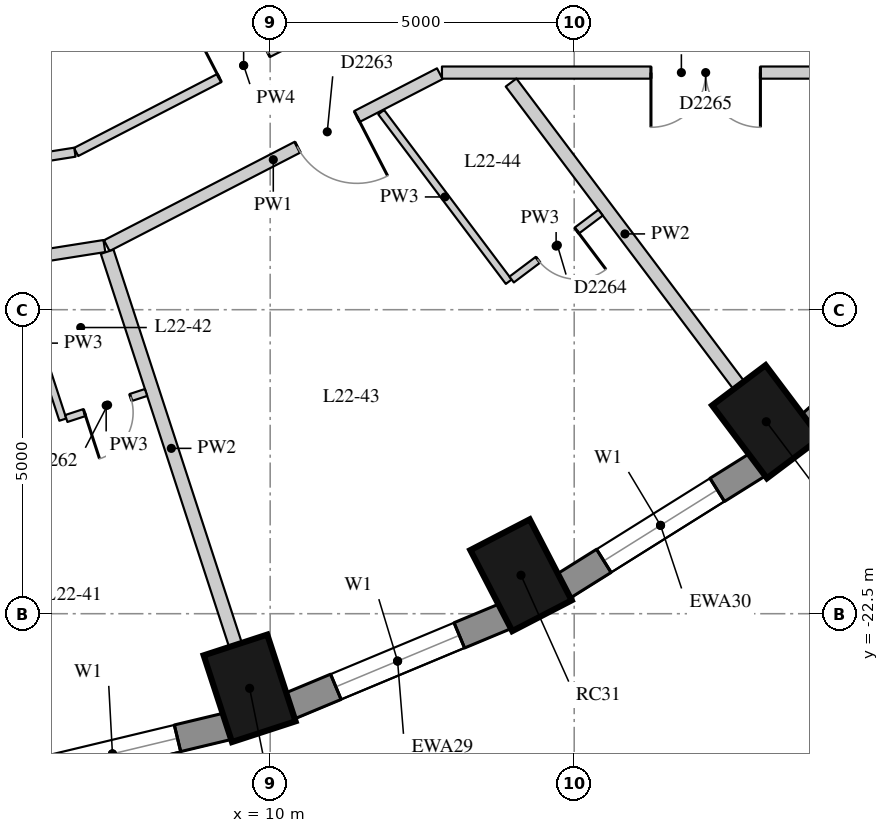
"""IFC4 building model, lengths in metres.
Left out: names, types, materials, properties, quantities, classifications, styles, units other than length and angle.
Written with IfcOpenShell. Run it as: python <this file> out.ifc"""

import sys

from ifc_helpers import new_model, si_unit, direction, frame, frame_2d, origin, origin_2d, place, context, subcontext, project, spatial, rectangle, extrude, element, fill, save


model = new_model("IFC4")
c1 = context("Model", 3, precision=1e-05, world=origin(), true_north=direction((0.0, 1.0)))
c2 = subcontext(c1, "Body", "Model", "MODEL_VIEW")
j1 = project(units=[si_unit("LENGTHUNIT", "METRE"), si_unit("PLANEANGLEUNIT", "RADIAN")], contexts=[c1])
p1 = place(None, origin())
s1 = spatial("IfcSite", under=j1, at=p1, CompositionType="ELEMENT")
p2 = place(p1, origin())
s2 = spatial("IfcBuilding", under=s1, at=p2, CompositionType="ELEMENT")
p3 = place(p2, frame((0.0, 0.0, 81.1)))
s3 = spatial("IfcBuildingStorey", under=s2, at=p3, CompositionType="ELEMENT", Elevation=81.1)
for number, where, z_axis, x_axis in (
    (1, (9.662, -23.727, 0.0), (0.0, 0.0, 1.0), (0.31, -0.951, 0.0)),
    (2, (14.125, -21.867, 0.0), (0.0, 0.0, 1.0), (0.46, -0.888, 0.0)),
    (3, (18.159, -19.343, 0.0), (0.0, 0.0, 1.0), (0.601, -0.799, 0.0)),
):
    element("IfcColumn", number, at=place(p3, frame(where, z_axis=z_axis, x_axis=x_axis)), inside=s3, PredefinedType="COLUMN", context=c2, shape_type="SweptSolid", body=[
        extrude(rectangle(XDim=1.5, YDim=1.1, at=origin_2d()), origin(), (0.0, 0.0, 1.0), 3.3),
    ])
p4 = place(p3, frame((5.504, -25.26, 0.0), z_axis=(0.0, 0.0, 1.0), x_axis=(0.972496561493, 0.232917233979, 0.0)))
e4 = element("IfcWall", 4, at=p4, inside=s3, PredefinedType="SOLIDWALL", context=c2, shape_type="SweptSolid", body=[
    extrude(rectangle(XDim=3.911, YDim=0.45, at=frame_2d((1.956, 0.0))), origin(), (0.0, 0.0, 1.0), 2.85),
])
p5 = place(p4, frame((0.855, 0.0, 0.4)))
e5 = element("IfcOpeningElement", 5, at=p5, cuts=e4, PredefinedType="OPENING", context=c2, shape_type="SweptSolid", body=[
    extrude(rectangle(XDim=2.2, YDim=1.75, at=frame_2d((1.1, 0.875))), frame((0.0, 0.235, 0.0), z_axis=(0.0, -1.0, 0.0), x_axis=(1.0, 0.0, 0.0)), (0.0, 0.0, 1.0), 0.47),
])
p6 = place(p3, frame((10.315, -24.021, 0.0), z_axis=(0.0, 0.0, 1.0), x_axis=(0.923031964282, 0.384723267966, 0.0)))
e6 = element("IfcWall", 6, at=p6, inside=s3, PredefinedType="SOLIDWALL", context=c2, shape_type="SweptSolid", body=[
    extrude(rectangle(XDim=3.856, YDim=0.45, at=frame_2d((1.928, 0.0))), origin(), (0.0, 0.0, 1.0), 2.85),
])
p7 = place(p6, frame((0.828, 0.0, 0.4)))
e7 = element("IfcOpeningElement", 7, at=p7, cuts=e6, PredefinedType="OPENING", context=c2, shape_type="SweptSolid", body=[
    extrude(rectangle(XDim=2.2, YDim=1.75, at=frame_2d((1.1, 0.875))), frame((0.0, 0.235, 0.0), z_axis=(0.0, -1.0, 0.0), x_axis=(1.0, 0.0, 0.0)), (0.0, 0.0, 1.0), 0.47),
])
p8 = place(p3, frame((14.817, -22.051, 0.0), z_axis=(0.0, 0.0, 1.0), x_axis=(0.847635480093, 0.530579016629, 0.0)))
e8 = element("IfcWall", 8, at=p8, inside=s3, PredefinedType="SOLIDWALL", context=c2, shape_type="SweptSolid", body=[
    extrude(rectangle(XDim=3.782, YDim=0.45, at=frame_2d((1.891, 0.0))), origin(), (0.0, 0.0, 1.0), 2.85),
])
p9 = place(p8, frame((0.791, 0.0, 0.4)))
e9 = element("IfcOpeningElement", 9, at=p9, cuts=e8, PredefinedType="OPENING", context=c2, shape_type="SweptSolid", body=[
    extrude(rectangle(XDim=2.2, YDim=1.75, at=frame_2d((1.1, 0.875))), frame((0.0, 0.235, 0.0), z_axis=(0.0, -1.0, 0.0), x_axis=(1.0, 0.0, 0.0)), (0.0, 0.0, 1.0), 0.47),
])
p10 = place(p3, frame((18.871, -19.407, 0.0), z_axis=(0.0, 0.0, 1.0), x_axis=(0.745526233716, 0.66647628228, 0.0)))
e10 = element("IfcWall", 10, at=p10, inside=s3, PredefinedType="SOLIDWALL", context=c2, shape_type="SweptSolid", body=[
    extrude(rectangle(XDim=3.697, YDim=0.45, at=frame_2d((1.848, 0.0))), origin(), (0.0, 0.0, 1.0), 2.85),
])
p11 = place(p3, frame((20.7, -13.6, 0.0), z_axis=(0.0, 0.0, 1.0), x_axis=(-1.0, 0.0, 0.0)))
e11 = element("IfcWall", 11, at=p11, inside=s3, PredefinedType="PARTITIONING", context=c2, shape_type="SweptSolid", body=[
    extrude(rectangle(XDim=7.875, YDim=0.2, at=frame_2d((3.938, 0.0))), origin(), (0.0, 0.0, 1.0), 2.85),
])
p12 = place(p11, frame((2.638, 0.0, 0.0)))
e12 = element("IfcOpeningElement", 12, at=p12, cuts=e11, PredefinedType="OPENING", context=c2, shape_type="SweptSolid", body=[
    extrude(rectangle(XDim=1.8, YDim=2.1, at=frame_2d((0.9, 1.05))), frame((0.0, 0.11, 0.0), z_axis=(0.0, -1.0, 0.0), x_axis=(1.0, 0.0, 0.0)), (0.0, 0.0, 1.0), 0.22),
])
p13 = place(p3, frame((12.79, -13.619, 0.0), z_axis=(0.0, 0.0, 1.0), x_axis=(-0.888545137607, -0.458789209152, 0.0)))
e13 = element("IfcWall", 13, at=p13, inside=s3, PredefinedType="PARTITIONING", context=c2, shape_type="SweptSolid", body=[
    extrude(rectangle(XDim=6.164, YDim=0.2, at=frame_2d((3.082, 0.0))), origin(), (0.0, 0.0, 1.0), 2.85),
])
p14 = place(p13, frame((1.533, 0.0, 0.0)))
e14 = element("IfcOpeningElement", 14, at=p14, cuts=e13, PredefinedType="OPENING", context=c2, shape_type="SweptSolid", body=[
    extrude(rectangle(XDim=1.1, YDim=2.1, at=frame_2d((0.55, 1.05))), frame((0.0, 0.11, 0.0), z_axis=(0.0, -1.0, 0.0), x_axis=(1.0, 0.0, 0.0)), (0.0, 0.0, 1.0), 0.22),
])
p15 = place(p3, frame((7.273, -16.453, 0.0), z_axis=(0.0, 0.0, 1.0), x_axis=(-0.987787686426, -0.155805925901, 0.0)))
e15 = element("IfcWall", 15, at=p15, inside=s3, PredefinedType="PARTITIONING", context=c2, shape_type="SweptSolid", body=[
    extrude(rectangle(XDim=7.363, YDim=0.2, at=frame_2d((3.682, 0.0))), origin(), (0.0, 0.0, 1.0), 2.85),
])
p16 = place(p15, frame((5.161, 0.0, 0.0)))
e16 = element("IfcOpeningElement", 16, at=p16, cuts=e15, PredefinedType="OPENING", context=c2, shape_type="SweptSolid", body=[
    extrude(rectangle(XDim=0.9, YDim=2.1, at=frame_2d((0.45, 1.05))), frame((0.0, 0.11, 0.0), z_axis=(0.0, -1.0, 0.0), x_axis=(1.0, 0.0, 0.0)), (0.0, 0.0, 1.0), 0.22),
])
p17 = place(p15, frame((1.957, 0.0, 0.0)))
e17 = element("IfcOpeningElement", 17, at=p17, cuts=e15, PredefinedType="OPENING", context=c2, shape_type="SweptSolid", body=[
    extrude(rectangle(XDim=1.0, YDim=2.1, at=frame_2d((0.5, 1.05))), frame((0.0, 0.11, 0.0), z_axis=(0.0, -1.0, 0.0), x_axis=(1.0, 0.0, 0.0)), (0.0, 0.0, 1.0), 0.22),
])
p18 = place(p3, frame((12.319, -12.061, 0.0), z_axis=(0.0, 0.0, 1.0), x_axis=(-0.888525413766, -0.458827406648, 0.0)))
e18 = element("IfcWall", 18, at=p18, inside=s3, PredefinedType="PARTITIONING", context=c2, shape_type="SweptSolid", body=[
    extrude(rectangle(XDim=6.202, YDim=0.15, at=frame_2d((3.101, 0.0))), origin(), (0.0, 0.0, 1.0), 2.85),
])
p19 = place(p18, frame((2.651, 0.0, 0.0)))
e19 = element("IfcOpeningElement", 19, at=p19, cuts=e18, PredefinedType="OPENING", context=c2, shape_type="SweptSolid", body=[
    extrude(rectangle(XDim=0.9, YDim=2.1, at=frame_2d((0.45, 1.05))), frame((0.0, 0.085, 0.0), z_axis=(0.0, -1.0, 0.0), x_axis=(1.0, 0.0, 0.0)), (0.0, 0.0, 1.0), 0.17),
])
p20 = place(p3, frame((6.788, -14.909, 0.0), z_axis=(0.0, 0.0, 1.0), x_axis=(-0.987791284458, -0.15578311317, 0.0)))
e20 = element("IfcWall", 20, at=p20, inside=s3, PredefinedType="PARTITIONING", context=c2, shape_type="SweptSolid", body=[
    extrude(rectangle(XDim=3.633, YDim=0.15, at=frame_2d((1.816, 0.0))), origin(), (0.0, 0.0, 1.0), 2.85),
])
p21 = place(p3, frame((9.429, -23.014, 0.0), z_axis=(0.0, 0.0, 1.0), x_axis=(-0.310213813997, 0.95066681314, 0.0)))
e21 = element("IfcWall", 21, at=p21, inside=s3, PredefinedType="PARTITIONING", context=c2, shape_type="SweptSolid", body=[
    extrude(rectangle(XDim=6.803, YDim=0.22, at=frame_2d((3.401, 0.0))), origin(), (0.0, 0.0, 1.0), 2.85),
])
p22 = place(p3, frame((17.708, -18.743, 0.0), z_axis=(0.0, 0.0, 1.0), x_axis=(-0.601177883261, 0.799115231164, 0.0)))
e22 = element("IfcWall", 22, at=p22, inside=s3, PredefinedType="PARTITIONING", context=c2, shape_type="SweptSolid", body=[
    extrude(rectangle(XDim=6.231, YDim=0.22, at=frame_2d((3.116, 0.0))), origin(), (0.0, 0.0, 1.0), 2.85),
])
p23 = place(p3, frame((5.768, -16.792, 0.0), z_axis=(0.0, 0.0, 1.0), x_axis=(0.310272506556, -0.950647659059, 0.0)))
e23 = element("IfcWall", 23, at=p23, inside=s3, PredefinedType="PARTITIONING", context=c2, shape_type="SweptSolid", body=[
    extrude(rectangle(XDim=2.647, YDim=0.12, at=frame_2d((1.323, 0.0))), origin(), (0.0, 0.0, 1.0), 2.85),
])
p24 = place(p3, frame((11.825, -14.251, 0.0), z_axis=(0.0, 0.0, 1.0), x_axis=(0.601196964615, -0.799100875821, 0.0)))
e24 = element("IfcWall", 24, at=p24, inside=s3, PredefinedType="PARTITIONING", context=c2, shape_type="SweptSolid", body=[
    extrude(rectangle(XDim=3.49, YDim=0.12, at=frame_2d((1.745, 0.0))), origin(), (0.0, 0.0, 1.0), 2.85),
])
p25 = place(p3, frame((6.647, -19.29, 0.0), z_axis=(0.0, 0.0, 1.0), x_axis=(0.950628893115, 0.310329997864, 0.0)))
e25 = element("IfcWall", 25, at=p25, inside=s3, PredefinedType="PARTITIONING", context=c2, shape_type="SweptSolid", body=[
    extrude(rectangle(XDim=1.38, YDim=0.12, at=frame_2d((0.69, 0.0))), origin(), (0.0, 0.0, 1.0), 2.85),
])
p26 = place(p25, frame((0.315, 0.0, 0.0)))
e26 = element("IfcOpeningElement", 26, at=p26, cuts=e25, PredefinedType="OPENING", context=c2, shape_type="SweptSolid", body=[
    extrude(rectangle(XDim=0.8, YDim=2.1, at=frame_2d((0.4, 1.05))), frame((0.0, 0.07, 0.0), z_axis=(0.0, -1.0, 0.0), x_axis=(1.0, 0.0, 0.0)), (0.0, 0.0, 1.0), 0.14),
])
p27 = place(p3, frame((13.971, -17.004, 0.0), z_axis=(0.0, 0.0, 1.0), x_axis=(0.799231057954, 0.60102388971, 0.0)))
e27 = element("IfcWall", 27, at=p27, inside=s3, PredefinedType="PARTITIONING", context=c2, shape_type="SweptSolid", body=[
    extrude(rectangle(XDim=1.83, YDim=0.12, at=frame_2d((0.915, 0.0))), origin(), (0.0, 0.0, 1.0), 2.85),
])
p28 = place(p27, frame((0.54, 0.0, 0.0)))
e28 = element("IfcOpeningElement", 28, at=p28, cuts=e27, PredefinedType="OPENING", context=c2, shape_type="SweptSolid", body=[
    extrude(rectangle(XDim=0.8, YDim=2.1, at=frame_2d((0.4, 1.05))), frame((0.0, 0.07, 0.0), z_axis=(0.0, -1.0, 0.0), x_axis=(1.0, 0.0, 0.0)), (0.0, 0.0, 1.0), 0.14),
])
p29 = place(p5, origin())
e29 = element("IfcWindow", 29, at=p29, inside=s3, PartitioningType="SINGLE_PANEL", PredefinedType="WINDOW", context=c2, shape_type="SweptSolid", body=[
    extrude(rectangle(XDim=2.2, YDim=1.75, at=frame_2d((1.1, 0.875))), frame((0.0, 0.035, 0.0), z_axis=(0.0, -1.0, 0.0), x_axis=(1.0, 0.0, 0.0)), (0.0, 0.0, 1.0), 0.06),
])
fill(e5, e29)
p30 = place(p7, origin())
e30 = element("IfcWindow", 30, at=p30, inside=s3, PartitioningType="SINGLE_PANEL", PredefinedType="WINDOW", context=c2, shape_type="SweptSolid", body=[
    extrude(rectangle(XDim=2.2, YDim=1.75, at=frame_2d((1.1, 0.875))), frame((0.0, 0.035, 0.0), z_axis=(0.0, -1.0, 0.0), x_axis=(1.0, 0.0, 0.0)), (0.0, 0.0, 1.0), 0.06),
])
fill(e7, e30)
p31 = place(p9, origin())
e31 = element("IfcWindow", 31, at=p31, inside=s3, PartitioningType="SINGLE_PANEL", PredefinedType="WINDOW", context=c2, shape_type="SweptSolid", body=[
    extrude(rectangle(XDim=2.2, YDim=1.75, at=frame_2d((1.1, 0.875))), frame((0.0, 0.035, 0.0), z_axis=(0.0, -1.0, 0.0), x_axis=(1.0, 0.0, 0.0)), (0.0, 0.0, 1.0), 0.06),
])
fill(e9, e31)
p32 = place(p26, origin())
e32 = element("IfcDoor", 32, at=p32, inside=s3, OperationType="SINGLE_SWING_RIGHT", PredefinedType="DOOR", context=c2, shape_type="SweptSolid", body=[
    extrude(rectangle(XDim=0.8, YDim=2.1, at=frame_2d((0.4, 1.05))), frame((0.0, 0.025, 0.0), z_axis=(0.0, -1.0, 0.0), x_axis=(1.0, 0.0, 0.0)), (0.0, 0.0, 1.0), 0.05),
])
fill(e26, e32)
p33 = place(p14, origin())
e33 = element("IfcDoor", 33, at=p33, inside=s3, OperationType="SINGLE_SWING_LEFT", PredefinedType="DOOR", context=c2, shape_type="SweptSolid", body=[
    extrude(rectangle(XDim=1.1, YDim=2.1, at=frame_2d((0.55, 1.05))), frame((0.0, 0.025, 0.0), z_axis=(0.0, -1.0, 0.0), x_axis=(1.0, 0.0, 0.0)), (0.0, 0.0, 1.0), 0.05),
])
fill(e14, e33)
p34 = place(p28, origin())
e34 = element("IfcDoor", 34, at=p34, inside=s3, OperationType="SINGLE_SWING_LEFT", PredefinedType="DOOR", context=c2, shape_type="SweptSolid", body=[
    extrude(rectangle(XDim=0.8, YDim=2.1, at=frame_2d((0.4, 1.05))), frame((0.0, 0.025, 0.0), z_axis=(0.0, -1.0, 0.0), x_axis=(1.0, 0.0, 0.0)), (0.0, 0.0, 1.0), 0.05),
])
fill(e28, e34)
p35 = place(p12, origin())
e35 = element("IfcDoor", 35, at=p35, inside=s3, OperationType="DOUBLE_DOOR_SINGLE_SWING", PredefinedType="DOOR", context=c2, shape_type="SweptSolid", body=[
    extrude(rectangle(XDim=1.8, YDim=2.1, at=frame_2d((0.9, 1.05))), frame((0.0, 0.025, 0.0), z_axis=(0.0, -1.0, 0.0), x_axis=(1.0, 0.0, 0.0)), (0.0, 0.0, 1.0), 0.05),
])
fill(e12, e35)
p36 = place(p19, origin())
e36 = element("IfcDoor", 36, at=p36, inside=s3, OperationType="SINGLE_SWING_LEFT", PredefinedType="DOOR", context=c2, shape_type="SweptSolid", body=[
    extrude(rectangle(XDim=0.9, YDim=2.1, at=frame_2d((0.45, 1.05))), frame((0.0, 0.025, 0.0), z_axis=(0.0, -1.0, 0.0), x_axis=(1.0, 0.0, 0.0)), (0.0, 0.0, 1.0), 0.05),
])
fill(e19, e36)
save(model, sys.argv[1])
